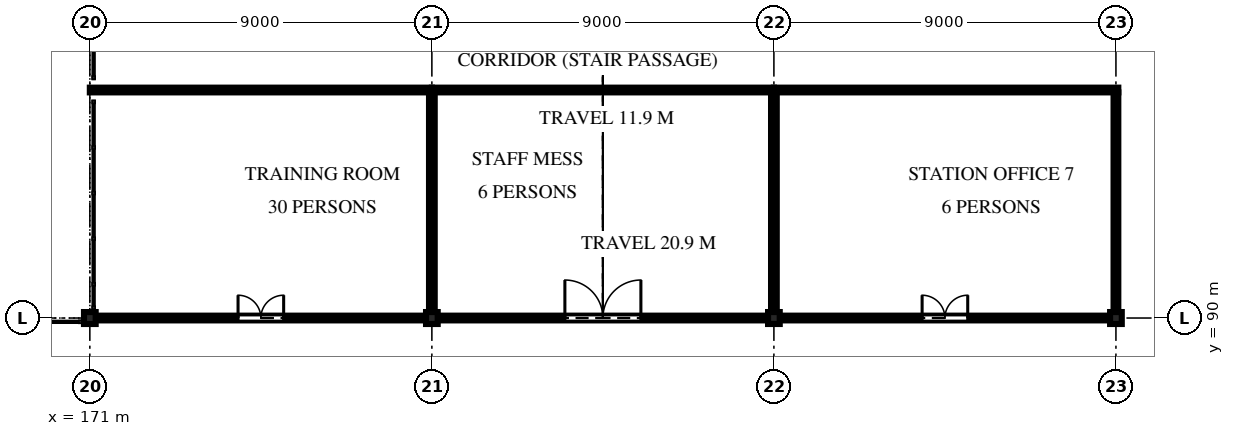
"""IFC4 building model, lengths in metres.
Left out: names, types, materials, properties, quantities, classifications, styles, units other than length and angle.
Written with IfcOpenShell. Run it as: python <this file> out.ifc"""

import sys

from ifc_helpers import new_model, si_unit, direction, frame, frame_2d, origin, origin_2d, place, context, subcontext, project, spatial, polyline, rectangle, i_section, outline, extrude, element, fill, save


model = new_model("IFC4")
c1 = context("Model", 3, precision=1e-05, world=origin(), true_north=direction((0.0, 1.0)))
c2 = subcontext(c1, "Body", "Model", "MODEL_VIEW")
j1 = project(units=[si_unit("LENGTHUNIT", "METRE"), si_unit("PLANEANGLEUNIT", "RADIAN")], contexts=[c1])
p1 = place(None, origin())
s1 = spatial("IfcSite", under=j1, at=p1, CompositionType="ELEMENT")
p2 = place(p1, origin())
s2 = spatial("IfcBuilding", under=s1, at=p2, CompositionType="ELEMENT")
p3 = place(p2, frame((0.0, 0.0, 7.5)))
s3 = spatial("IfcBuildingStorey", under=s2, at=p3, CompositionType="ELEMENT", Elevation=7.5)
for number, where, z_axis, x_axis in (
    (1, (171.0, 90.0, 0.0), (0.0, 0.0, 1.0), (1.0, 0.0, 0.0)),
    (2, (180.0, 90.0, 0.0), (0.0, 0.0, 1.0), (1.0, 0.0, 0.0)),
    (3, (189.0, 90.0, 0.0), (0.0, 0.0, 1.0), (1.0, 0.0, 0.0)),
    (4, (198.0, 90.0, 0.0), (0.0, 0.0, 1.0), (1.0, 0.0, 0.0)),
):
    element("IfcColumn", number, at=place(p3, frame(where, z_axis=z_axis, x_axis=x_axis)), inside=s3, PredefinedType="COLUMN", context=c2, shape_type="SweptSolid", body=[
        extrude(i_section(OverallWidth=0.307, OverallDepth=0.314, WebThickness=0.012, FlangeThickness=0.019, FilletRadius=0.015, at=origin_2d()), origin(), (0.0, 0.0, 1.0), 4.2),
    ])
p4 = place(p3, frame((198.062, 96.0, 0.0), z_axis=(0.0, 0.0, 1.0), x_axis=(-1.0, 0.0, 0.0)))
e5 = element("IfcWall", 5, at=p4, inside=s3, PredefinedType="PARTITIONING", context=c2, shape_type="SweptSolid", body=[
    extrude(rectangle(XDim=9.062, YDim=0.125, at=frame_2d((4.531, 0.0))), origin(), (0.0, 0.0, 1.0), 3.307),
])
for number, where, z_axis, x_axis in (
    (6, (189.0, 96.0, 0.0), (0.0, 0.0, 1.0), (-1.0, 0.0, 0.0)),
    (7, (180.0, 96.0, 0.0), (0.0, 0.0, 1.0), (-1.0, 0.0, 0.0)),
):
    element("IfcWall", number, at=place(p3, frame(where, z_axis=z_axis, x_axis=x_axis)), inside=s3, PredefinedType="PARTITIONING", context=c2, shape_type="SweptSolid", body=[
        extrude(rectangle(XDim=9.0, YDim=0.125, at=frame_2d((4.5, 0.0))), origin(), (0.0, 0.0, 1.0), 3.307),
    ])
p5 = place(p3, frame((189.154, 90.0, 0.0), z_axis=(0.0, 0.0, 1.0), x_axis=(1.0, 0.0, 0.0)))
e8 = element("IfcWall", 8, at=p5, inside=s3, PredefinedType="PARTITIONING", context=c2, shape_type="SweptSolid", body=[
    extrude(rectangle(XDim=8.692, YDim=0.125, at=frame_2d((4.346, 0.0))), origin(), (0.0, 0.0, 1.0), 3.307),
])
p6 = place(p5, frame((3.746, 0.0, 0.0)))
e9 = element("IfcOpeningElement", 9, at=p6, cuts=e8, PredefinedType="OPENING", context=c2, shape_type="SweptSolid", body=[
    extrude(rectangle(XDim=1.2, YDim=2.1, at=frame_2d((0.6, 1.05))), frame((0.0, 0.073, 0.0), z_axis=(0.0, -1.0, 0.0), x_axis=(1.0, 0.0, 0.0)), (0.0, 0.0, 1.0), 0.145),
])
p7 = place(p3, frame((180.154, 90.0, 0.0), z_axis=(0.0, 0.0, 1.0), x_axis=(1.0, 0.0, 0.0)))
e10 = element("IfcWall", 10, at=p7, inside=s3, PredefinedType="PARTITIONING", context=c2, shape_type="SweptSolid", body=[
    extrude(rectangle(XDim=8.692, YDim=0.125, at=frame_2d((4.346, 0.0))), origin(), (0.0, 0.0, 1.0), 3.307),
])
p8 = place(p7, frame((3.346, 0.0, 0.0)))
e11 = element("IfcOpeningElement", 11, at=p8, cuts=e10, PredefinedType="OPENING", context=c2, shape_type="SweptSolid", body=[
    extrude(rectangle(XDim=2.0, YDim=2.4, at=frame_2d((1.0, 1.2))), frame((0.0, 0.073, 0.0), z_axis=(0.0, -1.0, 0.0), x_axis=(1.0, 0.0, 0.0)), (0.0, 0.0, 1.0), 0.145),
])
p9 = place(p3, frame((171.154, 90.0, 0.0), z_axis=(0.0, 0.0, 1.0), x_axis=(1.0, 0.0, 0.0)))
e12 = element("IfcWall", 12, at=p9, inside=s3, PredefinedType="PARTITIONING", context=c2, shape_type="SweptSolid", body=[
    extrude(rectangle(XDim=8.692, YDim=0.125, at=frame_2d((4.346, 0.0))), origin(), (0.0, 0.0, 1.0), 3.307),
])
p10 = place(p9, frame((3.746, 0.0, 0.0)))
e13 = element("IfcOpeningElement", 13, at=p10, cuts=e12, PredefinedType="OPENING", context=c2, shape_type="SweptSolid", body=[
    extrude(rectangle(XDim=1.2, YDim=2.1, at=frame_2d((0.6, 1.05))), frame((0.0, 0.073, 0.0), z_axis=(0.0, -1.0, 0.0), x_axis=(1.0, 0.0, 0.0)), (0.0, 0.0, 1.0), 0.145),
])
p11 = place(p3, frame((198.0, 90.157, 0.0), z_axis=(0.0, 0.0, 1.0), x_axis=(0.0, 1.0, 0.0)))
e14 = element("IfcWall", 14, at=p11, inside=s3, PredefinedType="PARTITIONING", context=c2, shape_type="SweptSolid", body=[
    extrude(rectangle(XDim=5.78, YDim=0.125, at=frame_2d((2.89, 0.0))), origin(), (0.0, 0.0, 1.0), 3.307),
])
for number, where, z_axis, x_axis in (
    (15, (180.0, 95.938, 0.0), (0.0, 0.0, 1.0), (0.0, -1.0, 0.0)),
    (16, (189.0, 95.938, 0.0), (0.0, 0.0, 1.0), (0.0, -1.0, 0.0)),
):
    element("IfcWall", number, at=place(p3, frame(where, z_axis=z_axis, x_axis=x_axis)), inside=s3, PredefinedType="PARTITIONING", context=c2, shape_type="SweptSolid", body=[
        extrude(rectangle(XDim=5.78, YDim=0.15, at=frame_2d((2.89, 0.0))), origin(), (0.0, 0.0, 1.0), 3.307),
    ])
p12 = place(p10, origin())
e17 = element("IfcDoor", 17, at=p12, inside=s3, OperationType="DOUBLE_DOOR_SINGLE_SWING", PredefinedType="DOOR", context=c2, shape_type="SweptSolid", body=[
    extrude(outline(polyline([(0.0, 0.0), (0.07, 0.0), (0.07, 2.03), (1.13, 2.03), (1.13, 0.0), (1.2, 0.0), (1.2, 2.1), (0.0, 2.1), (0.0, 0.0)])), frame((0.0, 0.025, 0.0), z_axis=(0.0, -1.0, 0.0), x_axis=(1.0, 0.0, 0.0)), (0.0, 0.0, 1.0), 0.05),
    extrude(outline(polyline([(0.074, 0.01), (0.597, 0.01), (0.597, 2.026), (0.074, 2.026), (0.074, 0.01)]), holes=[polyline([(0.178, 0.373), (0.492, 0.373), (0.492, 1.784), (0.178, 1.784), (0.178, 0.373)])]), frame((0.0, 0.017, 0.0), z_axis=(0.0, -1.0, 0.0), x_axis=(1.0, 0.0, 0.0)), (0.0, 0.0, 1.0), 0.035),
    extrude(rectangle(XDim=0.314, YDim=1.411, at=frame_2d((0.335, 1.079))), frame((0.0, 0.009, 0.0), z_axis=(0.0, -1.0, 0.0), x_axis=(1.0, 0.0, 0.0)), (0.0, 0.0, 1.0), 0.017),
    extrude(outline(polyline([(0.603, 0.01), (1.126, 0.01), (1.126, 2.026), (0.603, 2.026), (0.603, 0.01)]), holes=[polyline([(0.708, 0.373), (1.021, 0.373), (1.021, 1.784), (0.708, 1.784), (0.708, 0.373)])]), frame((0.0, 0.017, 0.0), z_axis=(0.0, -1.0, 0.0), x_axis=(1.0, 0.0, 0.0)), (0.0, 0.0, 1.0), 0.035),
    extrude(rectangle(XDim=0.314, YDim=1.411, at=frame_2d((0.865, 1.079))), frame((0.0, 0.009, 0.0), z_axis=(0.0, -1.0, 0.0), x_axis=(1.0, 0.0, 0.0)), (0.0, 0.0, 1.0), 0.017),
])
fill(e13, e17)
p13 = place(p8, origin())
e18 = element("IfcDoor", 18, at=p13, inside=s3, OperationType="DOUBLE_DOOR_SINGLE_SWING", PredefinedType="DOOR", context=c2, shape_type="SweptSolid", body=[
    extrude(outline(polyline([(0.0, 0.0), (0.07, 0.0), (0.07, 2.33), (1.93, 2.33), (1.93, 0.0), (2.0, 0.0), (2.0, 2.4), (0.0, 2.4), (0.0, 0.0)])), frame((0.0, 0.025, 0.0), z_axis=(0.0, -1.0, 0.0), x_axis=(1.0, 0.0, 0.0)), (0.0, 0.0, 1.0), 0.05),
    extrude(outline(polyline([(0.074, 0.01), (0.997, 0.01), (0.997, 2.326), (0.074, 2.326), (0.074, 0.01)]), holes=[polyline([(0.194, 0.16), (0.877, 0.16), (0.877, 1.01), (0.194, 1.01), (0.194, 0.16)]), polyline([(0.385, 1.16), (0.686, 1.16), (0.686, 1.76), (0.385, 1.76), (0.385, 1.16)])]), frame((0.0, 0.017, 0.0), z_axis=(0.0, -1.0, 0.0), x_axis=(1.0, 0.0, 0.0)), (0.0, 0.0, 1.0), 0.035),
    extrude(rectangle(XDim=0.683, YDim=0.85, at=frame_2d((0.536, 0.585))), frame((0.0, 0.009, 0.0), z_axis=(0.0, -1.0, 0.0), x_axis=(1.0, 0.0, 0.0)), (0.0, 0.0, 1.0), 0.017),
    extrude(rectangle(XDim=0.3, YDim=0.6, at=frame_2d((0.536, 1.46))), frame((0.0, 0.006, 0.0), z_axis=(0.0, -1.0, 0.0), x_axis=(1.0, 0.0, 0.0)), (0.0, 0.0, 1.0), 0.012),
    extrude(outline(polyline([(1.003, 0.01), (1.926, 0.01), (1.926, 2.326), (1.003, 2.326), (1.003, 0.01)]), holes=[polyline([(1.123, 0.16), (1.806, 0.16), (1.806, 1.01), (1.123, 1.01), (1.123, 0.16)]), polyline([(1.314, 1.16), (1.615, 1.16), (1.615, 1.76), (1.314, 1.76), (1.314, 1.16)])]), frame((0.0, 0.017, 0.0), z_axis=(0.0, -1.0, 0.0), x_axis=(1.0, 0.0, 0.0)), (0.0, 0.0, 1.0), 0.035),
    extrude(rectangle(XDim=0.683, YDim=0.85, at=frame_2d((1.464, 0.585))), frame((0.0, 0.009, 0.0), z_axis=(0.0, -1.0, 0.0), x_axis=(1.0, 0.0, 0.0)), (0.0, 0.0, 1.0), 0.017),
    extrude(rectangle(XDim=0.3, YDim=0.6, at=frame_2d((1.464, 1.46))), frame((0.0, 0.006, 0.0), z_axis=(0.0, -1.0, 0.0), x_axis=(1.0, 0.0, 0.0)), (0.0, 0.0, 1.0), 0.012),
])
fill(e11, e18)
p14 = place(p6, origin())
e19 = element("IfcDoor", 19, at=p14, inside=s3, OperationType="DOUBLE_DOOR_SINGLE_SWING", PredefinedType="DOOR", context=c2, shape_type="SweptSolid", body=[
    extrude(outline(polyline([(0.0, 0.0), (0.07, 0.0), (0.07, 2.03), (1.13, 2.03), (1.13, 0.0), (1.2, 0.0), (1.2, 2.1), (0.0, 2.1), (0.0, 0.0)])), frame((0.0, 0.025, 0.0), z_axis=(0.0, -1.0, 0.0), x_axis=(1.0, 0.0, 0.0)), (0.0, 0.0, 1.0), 0.05),
    extrude(outline(polyline([(0.074, 0.01), (0.597, 0.01), (0.597, 2.026), (0.074, 2.026), (0.074, 0.01)]), holes=[polyline([(0.178, 0.373), (0.492, 0.373), (0.492, 1.784), (0.178, 1.784), (0.178, 0.373)])]), frame((0.0, 0.017, 0.0), z_axis=(0.0, -1.0, 0.0), x_axis=(1.0, 0.0, 0.0)), (0.0, 0.0, 1.0), 0.035),
    extrude(rectangle(XDim=0.314, YDim=1.411, at=frame_2d((0.335, 1.079))), frame((0.0, 0.009, 0.0), z_axis=(0.0, -1.0, 0.0), x_axis=(1.0, 0.0, 0.0)), (0.0, 0.0, 1.0), 0.017),
    extrude(outline(polyline([(0.603, 0.01), (1.126, 0.01), (1.126, 2.026), (0.603, 2.026), (0.603, 0.01)]), holes=[polyline([(0.708, 0.373), (1.021, 0.373), (1.021, 1.784), (0.708, 1.784), (0.708, 0.373)])]), frame((0.0, 0.017, 0.0), z_axis=(0.0, -1.0, 0.0), x_axis=(1.0, 0.0, 0.0)), (0.0, 0.0, 1.0), 0.035),
    extrude(rectangle(XDim=0.314, YDim=1.411, at=frame_2d((0.865, 1.079))), frame((0.0, 0.009, 0.0), z_axis=(0.0, -1.0, 0.0), x_axis=(1.0, 0.0, 0.0)), (0.0, 0.0, 1.0), 0.017),
])
fill(e9, e19)
save(model, sys.argv[1])
